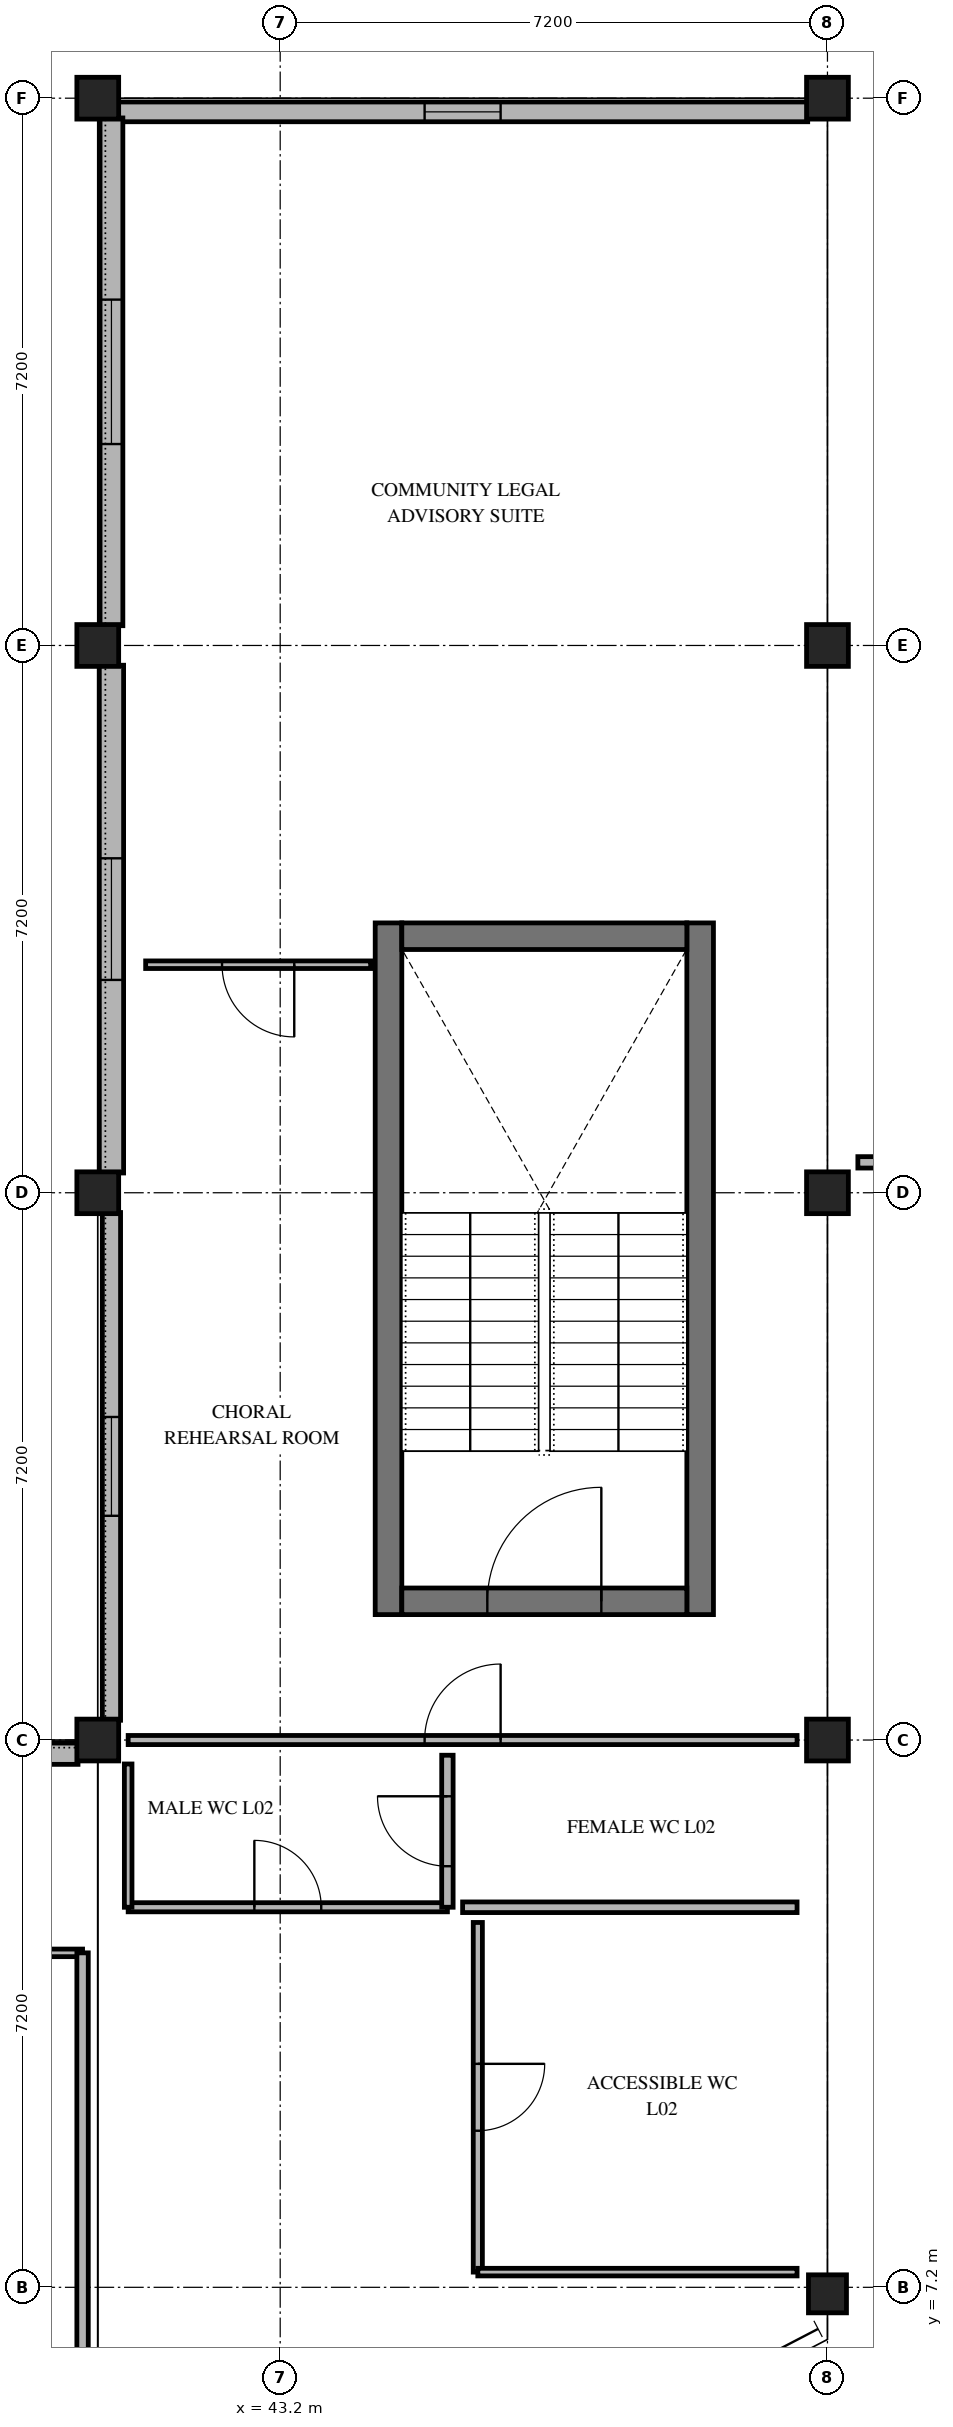
"""IFC4 building model, lengths in metres.
Left out: names, types, materials, properties, quantities, classifications, styles, units other than length and angle.
Written with IfcOpenShell. Run it as: python <this file> out.ifc"""

import sys

from ifc_helpers import new_model, si_unit, direction, frame, frame_2d, origin, origin_2d, place, context, subcontext, project, spatial, rectangle, circle, extrude, element, fill, save


model = new_model("IFC4")
c1 = context("Model", 3, precision=1e-05, world=origin(), true_north=direction((0.0, 1.0)))
c2 = subcontext(c1, "Body", "Model", "MODEL_VIEW")
j1 = project(units=[si_unit("LENGTHUNIT", "METRE"), si_unit("PLANEANGLEUNIT", "RADIAN")], contexts=[c1])
p1 = place(None, origin())
s1 = spatial("IfcSite", under=j1, at=p1, CompositionType="ELEMENT")
p2 = place(p1, origin())
s2 = spatial("IfcBuilding", under=s1, at=p2, CompositionType="ELEMENT")
p3 = place(p2, frame((0.0, 0.0, 8.7)))
s3 = spatial("IfcBuildingStorey", under=s2, at=p3, CompositionType="ELEMENT", Elevation=8.7)
p4 = place(p3, frame((50.4, 7.114, 0.0), z_axis=(0.0, 0.0, 1.0), x_axis=(1.0, 0.0, 0.0)))
e1 = element("IfcColumn", 1, at=p4, inside=s3, PredefinedType="COLUMN", context=c2, shape_type="SweptSolid", body=[
    extrude(circle(Radius=0.25, at=origin_2d()), origin(), (0.0, 0.0, 1.0), 4.2),
])
for number, where, z_axis, x_axis in (
    (2, (40.8, 14.4, 0.0), (0.0, 0.0, 1.0), (1.0, 0.0, 0.0)),
    (3, (40.8, 21.6, 0.0), (0.0, 0.0, 1.0), (1.0, 0.0, 0.0)),
    (4, (40.8, 28.8, 0.0), (0.0, 0.0, 1.0), (1.0, 0.0, 0.0)),
    (5, (40.8, 36.0, 0.0), (0.0, 0.0, 1.0), (1.0, 0.0, 0.0)),
    (6, (50.4, 14.4, 0.0), (0.0, 0.0, 1.0), (1.0, 0.0, 0.0)),
    (7, (50.4, 21.6, 0.0), (0.0, 0.0, 1.0), (1.0, 0.0, 0.0)),
    (8, (50.4, 28.8, 0.0), (0.0, 0.0, 1.0), (1.0, 0.0, 0.0)),
    (9, (50.4, 36.0, 0.0), (0.0, 0.0, 1.0), (1.0, 0.0, 0.0)),
):
    element("IfcColumn", number, at=place(p3, frame(where, z_axis=z_axis, x_axis=x_axis)), inside=s3, PredefinedType="COLUMN", context=c2, shape_type="SweptSolid", body=[
        extrude(rectangle(XDim=0.55, YDim=0.55, at=origin_2d()), origin(), (0.0, 0.0, 1.0), 4.2),
    ])
p5 = place(p3, frame((41.06, 35.82, 0.0), z_axis=(0.0, 0.0, 1.0), x_axis=(1.0, 0.0, 0.0)))
e10 = element("IfcWall", 10, at=p5, inside=s3, PredefinedType="SOLIDWALL", context=c2, shape_type="SweptSolid", body=[
    extrude(rectangle(XDim=9.08, YDim=0.26, at=frame_2d((4.54, 0.0))), origin(), (0.0, 0.0, 1.0), 3.96),
])
p6 = place(p5, frame((4.04, 0.0, 0.75)))
e11 = element("IfcOpeningElement", 11, at=p6, cuts=e10, PredefinedType="OPENING", context=c2, shape_type="SweptSolid", body=[
    extrude(rectangle(XDim=1.0, YDim=1.45, at=frame_2d((0.5, 0.725))), frame((0.0, 0.14, 0.0), z_axis=(0.0, -1.0, 0.0), x_axis=(1.0, 0.0, 0.0)), (0.0, 0.0, 1.0), 0.28),
])
p7 = place(p3, frame((40.98, 14.66, 0.0), z_axis=(0.0, 0.0, 1.0), x_axis=(0.0, 1.0, 0.0)))
e12 = element("IfcWall", 12, at=p7, inside=s3, PredefinedType="SOLIDWALL", context=c2, shape_type="SweptSolid", body=[
    extrude(rectangle(XDim=6.68, YDim=0.24, at=frame_2d((3.34, 0.0))), origin(), (0.0, 0.0, 1.0), 3.16),
])
p8 = place(p7, frame((2.69, 0.0, 0.75)))
e13 = element("IfcOpeningElement", 13, at=p8, cuts=e12, PredefinedType="OPENING", context=c2, shape_type="SweptSolid", body=[
    extrude(rectangle(XDim=1.3, YDim=1.45, at=frame_2d((0.65, 0.725))), frame((0.0, 0.13, 0.0), z_axis=(0.0, -1.0, 0.0), x_axis=(1.0, 0.0, 0.0)), (0.0, 0.0, 1.0), 0.26),
])
p9 = place(p3, frame((40.98, 21.86, 0.0), z_axis=(0.0, 0.0, 1.0), x_axis=(0.0, 1.0, 0.0)))
e14 = element("IfcWall", 14, at=p9, inside=s3, PredefinedType="SOLIDWALL", context=c2, shape_type="SweptSolid", body=[
    extrude(rectangle(XDim=6.68, YDim=0.32, at=frame_2d((3.34, 0.0))), origin(), (0.0, 0.0, 1.0), 3.21),
])
p10 = place(p9, frame((2.54, 0.0, 0.75)))
e15 = element("IfcOpeningElement", 15, at=p10, cuts=e14, PredefinedType="OPENING", context=c2, shape_type="SweptSolid", body=[
    extrude(rectangle(XDim=1.6, YDim=1.45, at=frame_2d((0.8, 0.725))), frame((0.0, 0.17, 0.0), z_axis=(0.0, -1.0, 0.0), x_axis=(1.0, 0.0, 0.0)), (0.0, 0.0, 1.0), 0.34),
])
p11 = place(p3, frame((40.98, 29.06, 0.0), z_axis=(0.0, 0.0, 1.0), x_axis=(0.0, 1.0, 0.0)))
e16 = element("IfcWall", 16, at=p11, inside=s3, PredefinedType="SOLIDWALL", context=c2, shape_type="SweptSolid", body=[
    extrude(rectangle(XDim=6.68, YDim=0.3, at=frame_2d((3.34, 0.0))), origin(), (0.0, 0.0, 1.0), 3.21),
])
p12 = place(p11, frame((2.39, 0.0, 0.75)))
e17 = element("IfcOpeningElement", 17, at=p12, cuts=e16, PredefinedType="OPENING", context=c2, shape_type="SweptSolid", body=[
    extrude(rectangle(XDim=1.9, YDim=1.45, at=frame_2d((0.95, 0.725))), frame((0.0, 0.16, 0.0), z_axis=(0.0, -1.0, 0.0), x_axis=(1.0, 0.0, 0.0)), (0.0, 0.0, 1.0), 0.32),
])
p13 = place(p3, frame((36.235, 14.22, 0.0), z_axis=(0.0, 0.0, 1.0), x_axis=(1.0, 0.0, 0.0)))
e18 = element("IfcWall", 18, at=p13, inside=s3, PredefinedType="SOLIDWALL", context=c2, shape_type="SweptSolid", body=[
    extrude(rectangle(XDim=4.305, YDim=0.28, at=frame_2d((2.152, 0.0))), origin(), (0.0, 0.0, 1.0), 3.96),
])
p14 = place(p13, frame((1.627, 0.0, 0.9)))
e19 = element("IfcOpeningElement", 19, at=p14, cuts=e18, PredefinedType="OPENING", context=c2, shape_type="SweptSolid", body=[
    extrude(rectangle(XDim=1.05, YDim=1.2, at=frame_2d((0.525, 0.6))), frame((0.0, 0.15, 0.0), z_axis=(0.0, -1.0, 0.0), x_axis=(1.0, 0.0, 0.0)), (0.0, 0.0, 1.0), 0.3),
])
p15 = place(p3, frame((108.15, 16.98, 0.0), z_axis=(0.0, 0.0, 1.0), x_axis=(-1.0, 0.0, 0.0)))
e20 = element("IfcWall", 20, at=p15, inside=s3, PredefinedType="SOLIDWALL", context=c2, shape_type="SweptSolid", body=[
    extrude(rectangle(XDim=57.9, YDim=0.3, at=frame_2d((28.95, 0.0))), origin(), (0.0, 0.0, 1.0), 3.16),
])
p16 = place(p15, frame((28.2, 0.0, 0.9)))
e21 = element("IfcOpeningElement", 21, at=p16, cuts=e20, PredefinedType="OPENING", context=c2, shape_type="SweptSolid", body=[
    extrude(rectangle(XDim=1.5, YDim=1.2, at=frame_2d((0.75, 0.6))), frame((0.0, 0.16, 0.0), z_axis=(0.0, -1.0, 0.0), x_axis=(1.0, 0.0, 0.0)), (0.0, 0.0, 1.0), 0.32),
])
p17 = place(p3, frame((50.25, 26.22, 0.0), z_axis=(0.0, 0.0, 1.0), x_axis=(1.0, 0.0, 0.0)))
e22 = element("IfcWall", 22, at=p17, inside=s3, PredefinedType="SOLIDWALL", context=c2, shape_type="SweptSolid", body=[
    extrude(rectangle(XDim=57.9, YDim=0.28, at=frame_2d((28.95, 0.0))), origin(), (0.0, 0.0, 1.0), 3.24),
])
p18 = place(p17, frame((28.125, 0.0, 0.9)))
e23 = element("IfcOpeningElement", 23, at=p18, cuts=e22, PredefinedType="OPENING", context=c2, shape_type="SweptSolid", body=[
    extrude(rectangle(XDim=1.65, YDim=1.2, at=frame_2d((0.825, 0.6))), frame((0.0, 0.15, 0.0), z_axis=(0.0, -1.0, 0.0), x_axis=(1.0, 0.0, 0.0)), (0.0, 0.0, 1.0), 0.3),
])
for number, where, z_axis, x_axis in (
    (24, (48.725, 16.05, 0.0), (0.0, 0.0, 1.0), (0.0, 1.0, 0.0)),
    (25, (44.625, 25.15, 0.0), (0.0, 0.0, 1.0), (0.0, -1.0, 0.0)),
):
    element("IfcWall", number, at=place(p3, frame(where, z_axis=z_axis, x_axis=x_axis)), inside=s3, PredefinedType="SHEAR", context=c2, shape_type="SweptSolid", body=[
        extrude(rectangle(XDim=9.1, YDim=0.35, at=frame_2d((4.55, 0.0))), origin(), (0.0, 0.0, 1.0), 3.96),
    ])
p19 = place(p3, frame((48.55, 24.975, 0.0), z_axis=(0.0, 0.0, 1.0), x_axis=(-1.0, 0.0, 0.0)))
e26 = element("IfcWall", 26, at=p19, inside=s3, PredefinedType="SHEAR", context=c2, shape_type="SweptSolid", body=[
    extrude(rectangle(XDim=3.75, YDim=0.35, at=frame_2d((1.875, 0.0))), origin(), (0.0, 0.0, 1.0), 3.96),
])
p20 = place(p3, frame((44.8, 16.225, 0.0), z_axis=(0.0, 0.0, 1.0), x_axis=(1.0, 0.0, 0.0)))
e27 = element("IfcWall", 27, at=p20, inside=s3, PredefinedType="SHEAR", context=c2, shape_type="SweptSolid", body=[
    extrude(rectangle(XDim=3.75, YDim=0.35, at=frame_2d((1.875, 0.0))), origin(), (0.0, 0.0, 1.0), 3.96),
])
p21 = place(p20, frame((1.125, 0.0, 0.0)))
e28 = element("IfcOpeningElement", 28, at=p21, cuts=e27, PredefinedType="OPENING", context=c2, shape_type="SweptSolid", body=[
    extrude(rectangle(XDim=1.5, YDim=2.2, at=frame_2d((0.75, 1.1))), frame((0.0, 0.185, 0.0), z_axis=(0.0, -1.0, 0.0), x_axis=(1.0, 0.0, 0.0)), (0.0, 0.0, 1.0), 0.37),
])
p22 = place(p3, frame((40.6, 11.6, 0.0), z_axis=(0.0, 0.0, 1.0), x_axis=(-1.0, 0.0, 0.0)))
e29 = element("IfcWall", 29, at=p22, inside=s3, PredefinedType="PARTITIONING", context=c2, shape_type="SweptSolid", body=[
    extrude(rectangle(XDim=30.8, YDim=0.1, at=frame_2d((15.4, 0.0))), origin(), (0.0, 0.0, 1.0), 3.96),
])
p23 = place(p22, frame((14.825, 0.0, 0.0)))
e30 = element("IfcOpeningElement", 30, at=p23, cuts=e29, PredefinedType="OPENING", context=c2, shape_type="SweptSolid", body=[
    extrude(rectangle(XDim=1.15, YDim=2.15, at=frame_2d((0.575, 1.075))), frame((0.0, 0.06, 0.0), z_axis=(0.0, -1.0, 0.0), x_axis=(1.0, 0.0, 0.0)), (0.0, 0.0, 1.0), 0.12),
])
p24 = place(p3, frame((40.6, 3.285, 0.0), z_axis=(0.0, 0.0, 1.0), x_axis=(0.0, 1.0, 0.0)))
e31 = element("IfcWall", 31, at=p24, inside=s3, PredefinedType="PARTITIONING", context=c2, shape_type="SweptSolid", body=[
    extrude(rectangle(XDim=8.315, YDim=0.15, at=frame_2d((4.157, 0.0))), origin(), (0.0, 0.0, 1.0), 3.36),
])
p25 = place(p3, frame((41.2, 14.4, 0.0), z_axis=(0.0, 0.0, 1.0), x_axis=(1.0, 0.0, 0.0)))
e32 = element("IfcWall", 32, at=p25, inside=s3, PredefinedType="PARTITIONING", context=c2, shape_type="SweptSolid", body=[
    extrude(rectangle(XDim=8.8, YDim=0.12, at=frame_2d((4.4, 0.0))), origin(), (0.0, 0.0, 1.0), 3.26),
])
p26 = place(p25, frame((3.9, 0.0, 0.0)))
e33 = element("IfcOpeningElement", 33, at=p26, cuts=e32, PredefinedType="OPENING", context=c2, shape_type="SweptSolid", body=[
    extrude(rectangle(XDim=1.0, YDim=2.15, at=frame_2d((0.5, 1.075))), frame((0.0, 0.07, 0.0), z_axis=(0.0, -1.0, 0.0), x_axis=(1.0, 0.0, 0.0)), (0.0, 0.0, 1.0), 0.14),
])
p27 = place(p3, frame((44.39, 24.6, 0.0), z_axis=(0.0, 0.0, 1.0), x_axis=(-1.0, 0.0, 0.0)))
e34 = element("IfcWall", 34, at=p27, inside=s3, PredefinedType="PARTITIONING", context=c2, shape_type="SweptSolid", body=[
    extrude(rectangle(XDim=2.96, YDim=0.1, at=frame_2d((1.48, 0.0))), origin(), (0.0, 0.0, 1.0), 3.96),
])
p28 = place(p27, frame((1.005, 0.0, 0.0)))
e35 = element("IfcOpeningElement", 35, at=p28, cuts=e34, PredefinedType="OPENING", context=c2, shape_type="SweptSolid", body=[
    extrude(rectangle(XDim=0.95, YDim=2.15, at=frame_2d((0.475, 1.075))), frame((0.0, 0.06, 0.0), z_axis=(0.0, -1.0, 0.0), x_axis=(1.0, 0.0, 0.0)), (0.0, 0.0, 1.0), 0.12),
])
p29 = place(p3, frame((54.84, 22.0, 0.0), z_axis=(0.0, 0.0, 1.0), x_axis=(-1.0, 0.0, 0.0)))
e36 = element("IfcWall", 36, at=p29, inside=s3, PredefinedType="PARTITIONING", context=c2, shape_type="SweptSolid", body=[
    extrude(rectangle(XDim=4.04, YDim=0.15, at=frame_2d((2.02, 0.0))), origin(), (0.0, 0.0, 1.0), 3.96),
])
p30 = place(p29, frame((2.145, 0.0, 0.0)))
e37 = element("IfcOpeningElement", 37, at=p30, cuts=e36, PredefinedType="OPENING", context=c2, shape_type="SweptSolid", body=[
    extrude(rectangle(XDim=0.9, YDim=2.1, at=frame_2d((0.45, 1.05))), frame((0.0, 0.085, 0.0), z_axis=(0.0, -1.0, 0.0), x_axis=(1.0, 0.0, 0.0)), (0.0, 0.0, 1.0), 0.17),
])
p31 = place(p3, frame((41.2, 12.2, 0.0), z_axis=(0.0, 0.0, 1.0), x_axis=(1.0, 0.0, 0.0)))
e38 = element("IfcWall", 38, at=p31, inside=s3, PredefinedType="PARTITIONING", context=c2, shape_type="SweptSolid", body=[
    extrude(rectangle(XDim=4.2, YDim=0.12, at=frame_2d((2.1, 0.0))), origin(), (0.0, 0.0, 1.0), 3.96),
])
p32 = place(p31, frame((1.66, 0.0, 0.0)))
e39 = element("IfcOpeningElement", 39, at=p32, cuts=e38, PredefinedType="OPENING", context=c2, shape_type="SweptSolid", body=[
    extrude(rectangle(XDim=0.88, YDim=2.1, at=frame_2d((0.44, 1.05))), frame((0.0, 0.07, 0.0), z_axis=(0.0, -1.0, 0.0), x_axis=(1.0, 0.0, 0.0)), (0.0, 0.0, 1.0), 0.14),
])
p33 = place(p3, frame((41.2, 14.085, 0.0), z_axis=(0.0, 0.0, 1.0), x_axis=(0.0, -1.0, 0.0)))
e40 = element("IfcWall", 40, at=p33, inside=s3, PredefinedType="PARTITIONING", context=c2, shape_type="SweptSolid", body=[
    extrude(rectangle(XDim=1.885, YDim=0.1, at=frame_2d((0.942, 0.0))), origin(), (0.0, 0.0, 1.0), 3.96),
])
p34 = place(p3, frame((45.4, 12.2, 0.0), z_axis=(0.0, 0.0, 1.0), x_axis=(0.0, 1.0, 0.0)))
e41 = element("IfcWall", 41, at=p34, inside=s3, PredefinedType="PARTITIONING", context=c2, shape_type="SweptSolid", body=[
    extrude(rectangle(XDim=2.0, YDim=0.15, at=frame_2d((1.0, 0.0))), origin(), (0.0, 0.0, 1.0), 3.26),
])
p35 = place(p34, frame((0.54, 0.0, 0.0)))
e42 = element("IfcOpeningElement", 42, at=p35, cuts=e41, PredefinedType="OPENING", context=c2, shape_type="SweptSolid", body=[
    extrude(rectangle(XDim=0.92, YDim=2.1, at=frame_2d((0.46, 1.05))), frame((0.0, 0.085, 0.0), z_axis=(0.0, -1.0, 0.0), x_axis=(1.0, 0.0, 0.0)), (0.0, 0.0, 1.0), 0.17),
])
p36 = place(p3, frame((45.6, 12.2, 0.0), z_axis=(0.0, 0.0, 1.0), x_axis=(1.0, 0.0, 0.0)))
e43 = element("IfcWall", 43, at=p36, inside=s3, PredefinedType="PARTITIONING", context=c2, shape_type="SweptSolid", body=[
    extrude(rectangle(XDim=4.4, YDim=0.14, at=frame_2d((2.2, 0.0))), origin(), (0.0, 0.0, 1.0), 3.96),
])
p37 = place(p3, frame((45.8, 12.0, 0.0), z_axis=(0.0, 0.0, 1.0), x_axis=(0.0, -1.0, 0.0)))
e44 = element("IfcWall", 44, at=p37, inside=s3, PredefinedType="PARTITIONING", context=c2, shape_type="SweptSolid", body=[
    extrude(rectangle(XDim=4.6, YDim=0.12, at=frame_2d((2.3, 0.0))), origin(), (0.0, 0.0, 1.0), 3.36),
])
p38 = place(p37, frame((1.86, 0.0, 0.0)))
e45 = element("IfcOpeningElement", 45, at=p38, cuts=e44, PredefinedType="OPENING", context=c2, shape_type="SweptSolid", body=[
    extrude(rectangle(XDim=0.88, YDim=2.1, at=frame_2d((0.44, 1.05))), frame((0.0, 0.07, 0.0), z_axis=(0.0, -1.0, 0.0), x_axis=(1.0, 0.0, 0.0)), (0.0, 0.0, 1.0), 0.14),
])
p39 = place(p3, frame((45.8, 7.4, 0.0), z_axis=(0.0, 0.0, 1.0), x_axis=(1.0, 0.0, 0.0)))
e46 = element("IfcWall", 46, at=p39, inside=s3, PredefinedType="PARTITIONING", context=c2, shape_type="SweptSolid", body=[
    extrude(rectangle(XDim=4.2, YDim=0.1, at=frame_2d((2.1, 0.0))), origin(), (0.0, 0.0, 1.0), 3.36),
])
p40 = place(p6, origin())
e47 = element("IfcWindow", 47, at=p40, inside=s3, PartitioningType="SINGLE_PANEL", PredefinedType="WINDOW", context=c2, shape_type="SweptSolid", body=[
    extrude(rectangle(XDim=1.0, YDim=1.45, at=frame_2d((0.5, 0.725))), frame((0.0, 0.03, 0.0), z_axis=(0.0, -1.0, 0.0), x_axis=(1.0, 0.0, 0.0)), (0.0, 0.0, 1.0), 0.06),
])
fill(e11, e47)
p41 = place(p8, origin())
e48 = element("IfcWindow", 48, at=p41, inside=s3, PartitioningType="SINGLE_PANEL", PredefinedType="WINDOW", context=c2, shape_type="SweptSolid", body=[
    extrude(rectangle(XDim=1.3, YDim=1.45, at=frame_2d((0.65, 0.725))), frame((0.0, 0.03, 0.0), z_axis=(0.0, -1.0, 0.0), x_axis=(1.0, 0.0, 0.0)), (0.0, 0.0, 1.0), 0.06),
])
fill(e13, e48)
p42 = place(p10, origin())
e49 = element("IfcWindow", 49, at=p42, inside=s3, PartitioningType="SINGLE_PANEL", PredefinedType="WINDOW", context=c2, shape_type="SweptSolid", body=[
    extrude(rectangle(XDim=1.6, YDim=1.45, at=frame_2d((0.8, 0.725))), frame((0.0, 0.03, 0.0), z_axis=(0.0, -1.0, 0.0), x_axis=(1.0, 0.0, 0.0)), (0.0, 0.0, 1.0), 0.06),
])
fill(e15, e49)
p43 = place(p12, origin())
e50 = element("IfcWindow", 50, at=p43, inside=s3, PartitioningType="SINGLE_PANEL", PredefinedType="WINDOW", context=c2, shape_type="SweptSolid", body=[
    extrude(rectangle(XDim=1.9, YDim=1.45, at=frame_2d((0.95, 0.725))), frame((0.0, 0.03, 0.0), z_axis=(0.0, -1.0, 0.0), x_axis=(1.0, 0.0, 0.0)), (0.0, 0.0, 1.0), 0.06),
])
fill(e17, e50)
p44 = place(p21, origin())
e51 = element("IfcDoor", 51, at=p44, inside=s3, OperationType="SINGLE_SWING_RIGHT", PredefinedType="DOOR", context=c2, shape_type="SweptSolid", body=[
    extrude(rectangle(XDim=1.5, YDim=2.2, at=frame_2d((0.75, 1.1))), frame((0.0, 0.025, 0.0), z_axis=(0.0, -1.0, 0.0), x_axis=(1.0, 0.0, 0.0)), (0.0, 0.0, 1.0), 0.05),
])
fill(e28, e51)
p45 = place(p26, origin())
e52 = element("IfcDoor", 52, at=p45, inside=s3, OperationType="SINGLE_SWING_RIGHT", PredefinedType="DOOR", context=c2, shape_type="SweptSolid", body=[
    extrude(rectangle(XDim=1.0, YDim=2.15, at=frame_2d((0.5, 1.075))), frame((0.0, 0.025, 0.0), z_axis=(0.0, -1.0, 0.0), x_axis=(1.0, 0.0, 0.0)), (0.0, 0.0, 1.0), 0.05),
])
fill(e33, e52)
p46 = place(p28, origin())
e53 = element("IfcDoor", 53, at=p46, inside=s3, OperationType="SINGLE_SWING_LEFT", PredefinedType="DOOR", context=c2, shape_type="SweptSolid", body=[
    extrude(rectangle(XDim=0.95, YDim=2.15, at=frame_2d((0.475, 1.075))), frame((0.0, 0.025, 0.0), z_axis=(0.0, -1.0, 0.0), x_axis=(1.0, 0.0, 0.0)), (0.0, 0.0, 1.0), 0.05),
])
fill(e35, e53)
p47 = place(p32, origin())
e54 = element("IfcDoor", 54, at=p47, inside=s3, OperationType="SINGLE_SWING_LEFT", PredefinedType="DOOR", context=c2, shape_type="SweptSolid", body=[
    extrude(rectangle(XDim=0.88, YDim=2.1, at=frame_2d((0.44, 1.05))), frame((0.0, 0.025, 0.0), z_axis=(0.0, -1.0, 0.0), x_axis=(1.0, 0.0, 0.0)), (0.0, 0.0, 1.0), 0.05),
])
fill(e39, e54)
p48 = place(p35, origin())
e55 = element("IfcDoor", 55, at=p48, inside=s3, OperationType="SINGLE_SWING_RIGHT", PredefinedType="DOOR", context=c2, shape_type="SweptSolid", body=[
    extrude(rectangle(XDim=0.92, YDim=2.1, at=frame_2d((0.46, 1.05))), frame((0.0, 0.025, 0.0), z_axis=(0.0, -1.0, 0.0), x_axis=(1.0, 0.0, 0.0)), (0.0, 0.0, 1.0), 0.05),
])
fill(e42, e55)
p49 = place(p38, origin())
e56 = element("IfcDoor", 56, at=p49, inside=s3, OperationType="SINGLE_SWING_LEFT", PredefinedType="DOOR", context=c2, shape_type="SweptSolid", body=[
    extrude(rectangle(XDim=0.88, YDim=2.1, at=frame_2d((0.44, 1.05))), frame((0.0, 0.025, 0.0), z_axis=(0.0, -1.0, 0.0), x_axis=(1.0, 0.0, 0.0)), (0.0, 0.0, 1.0), 0.05),
])
fill(e45, e56)
save(model, sys.argv[1])
